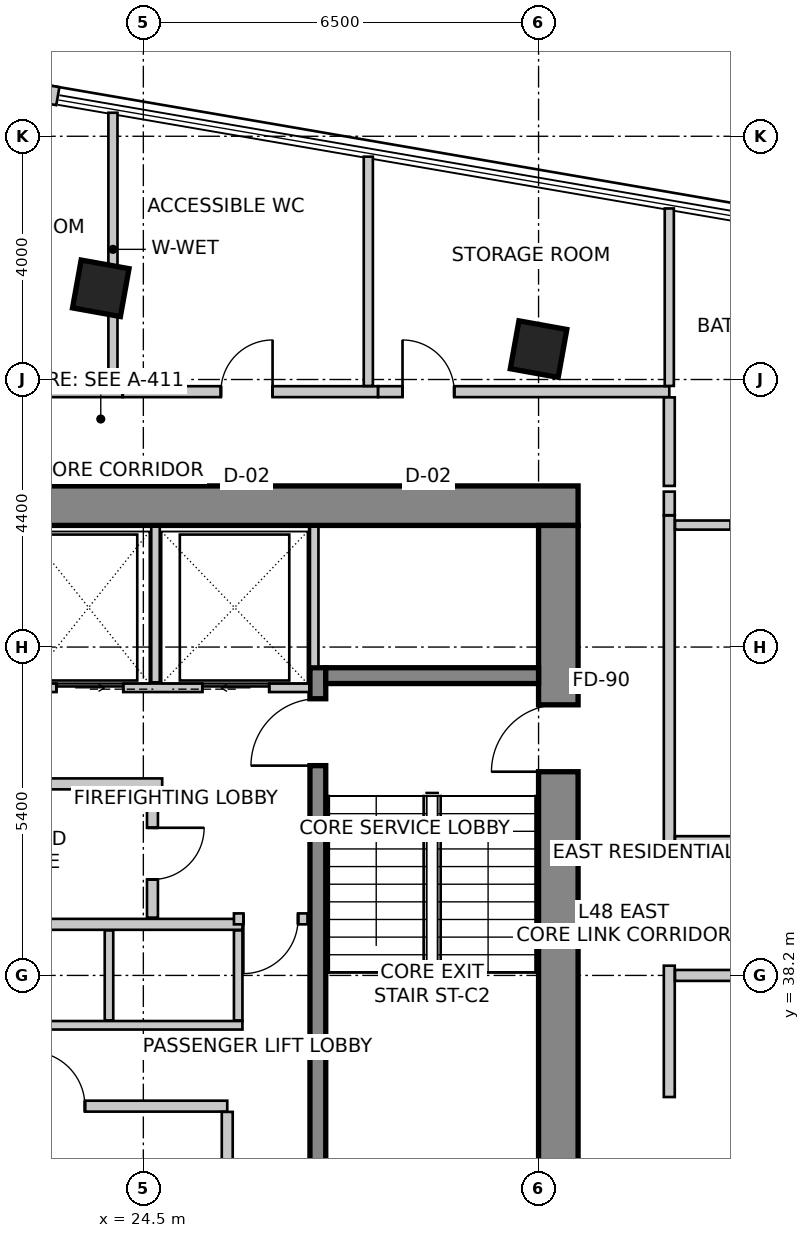
"""IFC4 building model, lengths in metres.
Left out: names, types, materials, properties, quantities, classifications, styles, units other than length and angle.
Written with IfcOpenShell. Run it as: python <this file> out.ifc"""

import sys

from ifc_helpers import new_model, si_unit, direction, frame, frame_2d, origin, origin_2d, place, context, subcontext, project, spatial, rectangle, extrude, source, transform, mapped, element, fill, save


model = new_model("IFC4")
c1 = context("Model", 3, precision=1e-05, world=origin(), true_north=direction((0.0, 1.0)))
c2 = subcontext(c1, "Body", "Model", "MODEL_VIEW")
j1 = project(units=[si_unit("LENGTHUNIT", "METRE"), si_unit("PLANEANGLEUNIT", "RADIAN")], contexts=[c1])
p1 = place(None, origin())
s1 = spatial("IfcSite", under=j1, at=p1, CompositionType="ELEMENT")
p2 = place(p1, origin())
s2 = spatial("IfcBuilding", under=s1, at=p2, CompositionType="ELEMENT")
p3 = place(p2, frame((0.0, 0.0, 193.9)))
s3 = spatial("IfcBuildingStorey", under=s2, at=p3, CompositionType="ELEMENT", Elevation=193.9)
p4 = place(p3, frame((15.95, 45.925, 0.0), z_axis=(0.0, 0.0, 1.0), x_axis=(1.0, 0.0, 0.0)))
e1 = element("IfcWall", 1, at=p4, inside=s3, PredefinedType="SHEAR", context=c2, shape_type="SweptSolid", body=[
    extrude(rectangle(XDim=15.7, YDim=0.65, at=frame_2d((7.85, 0.0))), origin(), (0.0, 0.0, 1.0), 3.5),
])
p5 = place(p3, frame((31.325, 34.2, 0.0), z_axis=(0.0, 0.0, 1.0), x_axis=(0.0, 1.0, 0.0)))
e2 = element("IfcWall", 2, at=p5, inside=s3, PredefinedType="SHEAR", context=c2, shape_type="SweptSolid", body=[
    extrude(rectangle(XDim=11.4, YDim=0.65, at=frame_2d((5.7, 0.0))), origin(), (0.0, 0.0, 1.0), 3.5),
])
m1 = source(origin(), c2, "Body", "SweptSolid", [
    extrude(rectangle(XDim=1.1, YDim=2.15, at=frame_2d((0.55, 1.075))), frame((0.0, 0.335, 0.0), z_axis=(0.0, -1.0, 0.0), x_axis=(1.0, 0.0, 0.0)), (0.0, 0.0, 1.0), 0.67),
])
p6 = place(p5, frame((7.35, 0.0, 0.0)))
e3 = element("IfcOpeningElement", 3, at=p6, cuts=e2, PredefinedType="OPENING", context=c2, shape_type="MappedRepresentation", body=[
    mapped(m1, transform((0.0, 0.0, 0.0), scale=1.0)),
])
p7 = place(p3, frame((27.37, 34.2, 0.0), z_axis=(0.0, 0.0, 1.0), x_axis=(0.0, 1.0, 0.0)))
e4 = element("IfcWall", 4, at=p7, inside=s3, PredefinedType="SHEAR", context=c2, shape_type="SweptSolid", body=[
    extrude(rectangle(XDim=9.06, YDim=0.26, at=frame_2d((4.53, 0.0))), origin(), (0.0, 0.0, 1.0), 3.5),
])
m2 = source(origin(), c2, "Body", "SweptSolid", [
    extrude(rectangle(XDim=1.1, YDim=2.15, at=frame_2d((0.55, 1.075))), frame((0.0, 0.14, 0.0), z_axis=(0.0, -1.0, 0.0), x_axis=(1.0, 0.0, 0.0)), (0.0, 0.0, 1.0), 0.28),
])
p8 = place(p7, frame((7.45, 0.0, 0.0)))
e5 = element("IfcOpeningElement", 5, at=p8, cuts=e4, PredefinedType="OPENING", context=c2, shape_type="MappedRepresentation", body=[
    mapped(m2, transform((0.0, 0.0, 0.0), scale=1.0)),
])
p9 = place(p3, frame((27.5, 43.13, 0.0), z_axis=(0.0, 0.0, 1.0), x_axis=(1.0, 0.0, 0.0)))
e6 = element("IfcWall", 6, at=p9, inside=s3, PredefinedType="SHEAR", context=c2, shape_type="SweptSolid", body=[
    extrude(rectangle(XDim=3.5, YDim=0.26, at=frame_2d((1.75, 0.0))), origin(), (0.0, 0.0, 1.0), 3.5),
])
m3 = source(origin(), c2, "Body", "SweptSolid", [
    extrude(rectangle(XDim=0.8, YDim=0.8, at=origin_2d()), origin(), (0.0, 0.0, 1.0), 3.5),
])
for number, where, z_axis, x_axis in (
    (7, (23.8, 49.5, 0.0), (0.0, 0.0, 1.0), (0.984, -0.177, 0.0)),
    (8, (31.0, 48.5, 0.0), (0.0, 0.0, 1.0), (0.984, -0.177, 0.0)),
):
    element("IfcColumn", number, at=place(p3, frame(where, z_axis=z_axis, x_axis=x_axis)), inside=s3, PredefinedType="COLUMN", context=c2, shape_type="MappedRepresentation", body=[
        mapped(m3, transform((0.0, 0.0, 0.0), scale=1.0)),
    ])
p10 = place(p3, frame((23.094, 52.66, 0.0), z_axis=(0.0, 0.0, 1.0), x_axis=(-0.985503719785, 0.169653818966, 0.0)))
e9 = element("IfcWall", 9, at=p10, inside=s3, PredefinedType="SOLIDWALL", context=c2, shape_type="SweptSolid", body=[
    extrude(rectangle(XDim=1.228, YDim=0.3, at=frame_2d((0.614, 0.0))), origin(), (0.0, 0.0, 1.0), 3.25),
])
p11 = place(p3, frame((20.37, 42.93, 0.0), z_axis=(0.0, 0.0, 1.0), x_axis=(1.0, 0.0, 0.0)))
e10 = element("IfcWall", 10, at=p11, inside=s3, PredefinedType="SOLIDWALL", context=c2, shape_type="SweptSolid", body=[
    extrude(rectangle(XDim=6.86, YDim=0.14, at=frame_2d((3.43, 0.0))), origin(), (0.0, 0.0, 1.0), 3.25),
])
m4 = source(origin(), c2, "Body", "SweptSolid", [
    extrude(rectangle(XDim=1.1, YDim=2.15, at=frame_2d((0.55, 1.075))), frame((0.0, 0.08, 0.0), z_axis=(0.0, -1.0, 0.0), x_axis=(1.0, 0.0, 0.0)), (0.0, 0.0, 1.0), 0.16),
])
p12 = place(p11, frame((0.5, 0.0, 0.0)))
e11 = element("IfcOpeningElement", 11, at=p12, cuts=e10, PredefinedType="OPENING", context=c2, shape_type="MappedRepresentation", body=[
    mapped(m4, transform((0.0, 0.0, 0.0), scale=1.0)),
])
p13 = place(p11, frame((2.7, 0.0, 0.0)))
e12 = element("IfcOpeningElement", 12, at=p13, cuts=e10, PredefinedType="OPENING", context=c2, shape_type="MappedRepresentation", body=[
    mapped(m4, transform((0.0, 0.0, 0.0), scale=1.0)),
])
p14 = place(p11, frame((5.1, 0.0, 0.0)))
e13 = element("IfcOpeningElement", 13, at=p14, cuts=e10, PredefinedType="OPENING", context=c2, shape_type="MappedRepresentation", body=[
    mapped(m4, transform((0.0, 0.0, 0.0), scale=1.0)),
])
p15 = place(p3, frame((27.31, 43.28, 0.0), z_axis=(0.0, 0.0, 1.0), x_axis=(0.0, 1.0, 0.0)))
e14 = element("IfcWall", 14, at=p15, inside=s3, PredefinedType="SOLIDWALL", context=c2, shape_type="SweptSolid", body=[
    extrude(rectangle(XDim=2.3, YDim=0.14, at=frame_2d((1.15, 0.0))), origin(), (0.0, 0.0, 1.0), 3.25),
])
p16 = place(p3, frame((24.7, 43.02, 0.0), z_axis=(0.0, 0.0, 1.0), x_axis=(0.0, 1.0, 0.0)))
e15 = element("IfcWall", 15, at=p16, inside=s3, PredefinedType="SOLIDWALL", context=c2, shape_type="SweptSolid", body=[
    extrude(rectangle(XDim=2.56, YDim=0.14, at=frame_2d((1.28, 0.0))), origin(), (0.0, 0.0, 1.0), 3.25),
])
p17 = place(p3, frame((20.38, 37.38, 0.0), z_axis=(0.0, 0.0, 1.0), x_axis=(1.0, 0.0, 0.0)))
e16 = element("IfcWall", 16, at=p17, inside=s3, PredefinedType="SOLIDWALL", context=c2, shape_type="SweptSolid", body=[
    extrude(rectangle(XDim=5.75, YDim=0.14, at=frame_2d((2.875, 0.0))), origin(), (0.0, 0.0, 1.0), 3.25),
])
m5 = source(origin(), c2, "Body", "SweptSolid", [
    extrude(rectangle(XDim=1.0, YDim=2.15, at=frame_2d((0.5, 1.075))), frame((0.0, 0.08, 0.0), z_axis=(0.0, -1.0, 0.0), x_axis=(1.0, 0.0, 0.0)), (0.0, 0.0, 1.0), 0.16),
])
p18 = place(p17, frame((0.19, 0.0, 0.0)))
e17 = element("IfcOpeningElement", 17, at=p18, cuts=e16, PredefinedType="OPENING", context=c2, shape_type="MappedRepresentation", body=[
    mapped(m5, transform((0.0, 0.0, 0.0), scale=1.0)),
])
p19 = place(p3, frame((20.38, 39.04, 0.0), z_axis=(0.0, 0.0, 1.0), x_axis=(1.0, 0.0, 0.0)))
e18 = element("IfcWall", 18, at=p19, inside=s3, PredefinedType="SOLIDWALL", context=c2, shape_type="SweptSolid", body=[
    extrude(rectangle(XDim=5.75, YDim=0.18, at=frame_2d((2.875, 0.0))), origin(), (0.0, 0.0, 1.0), 3.25),
])
for number, where, z_axis, x_axis in (
    (19, (26.06, 37.46, 0.0), (0.0, 0.0, 1.0), (0.0, 1.0, 0.0)),
    (20, (23.935, 37.46, 0.0), (0.0, 0.0, 1.0), (0.0, 1.0, 0.0)),
):
    element("IfcWall", number, at=place(p3, frame(where, z_axis=z_axis, x_axis=x_axis)), inside=s3, PredefinedType="SOLIDWALL", context=c2, shape_type="SweptSolid", body=[
        extrude(rectangle(XDim=1.48, YDim=0.14, at=frame_2d((0.74, 0.0))), origin(), (0.0, 0.0, 1.0), 3.25),
    ])
p20 = place(p3, frame((24.81, 41.35, 0.0), z_axis=(0.0, 0.0, 1.0), x_axis=(-1.0, 0.0, 0.0)))
e21 = element("IfcWall", 21, at=p20, inside=s3, PredefinedType="PARTITIONING", context=c2, shape_type="SweptSolid", body=[
    extrude(rectangle(XDim=4.43, YDim=0.18, at=frame_2d((2.215, 0.0))), origin(), (0.0, 0.0, 1.0), 3.25),
])
p21 = place(p3, frame((24.65, 41.256, 0.0), z_axis=(0.0, 0.0, 1.0), x_axis=(0.0, -1.0, 0.0)))
e22 = element("IfcWall", 22, at=p21, inside=s3, PredefinedType="PARTITIONING", context=c2, shape_type="SweptSolid", body=[
    extrude(rectangle(XDim=2.106, YDim=0.18, at=frame_2d((1.053, 0.0))), origin(), (0.0, 0.0, 1.0), 3.25),
])
m6 = source(origin(), c2, "Body", "SweptSolid", [
    extrude(rectangle(XDim=0.85, YDim=2.15, at=frame_2d((0.425, 1.075))), frame((0.0, 0.1, 0.0), z_axis=(0.0, -1.0, 0.0), x_axis=(1.0, 0.0, 0.0)), (0.0, 0.0, 1.0), 0.2),
])
p22 = place(p21, frame((0.628, 0.0, 0.0)))
e23 = element("IfcOpeningElement", 23, at=p22, cuts=e22, PredefinedType="OPENING", context=c2, shape_type="MappedRepresentation", body=[
    mapped(m6, transform((0.0, 0.0, 0.0), scale=1.0)),
])
p23 = place(p3, frame((27.2, 39.13, 0.0), z_axis=(0.0, 0.0, 1.0), x_axis=(-1.0, 0.0, 0.0)))
e24 = element("IfcWall", 24, at=p23, inside=s3, PredefinedType="PARTITIONING", context=c2, shape_type="SweptSolid", body=[
    extrude(rectangle(XDim=1.21, YDim=0.18, at=frame_2d((0.605, 0.0))), origin(), (0.0, 0.0, 1.0), 3.25),
])
m7 = source(origin(), c2, "Body", "SweptSolid", [
    extrude(rectangle(XDim=0.9, YDim=2.15, at=frame_2d((0.45, 1.075))), frame((0.0, 0.1, 0.0), z_axis=(0.0, -1.0, 0.0), x_axis=(1.0, 0.0, 0.0)), (0.0, 0.0, 1.0), 0.2),
])
p24 = place(p23, frame((0.155, 0.0, 0.0)))
e25 = element("IfcOpeningElement", 25, at=p24, cuts=e24, PredefinedType="OPENING", context=c2, shape_type="MappedRepresentation", body=[
    mapped(m7, transform((0.0, 0.0, 0.0), scale=1.0)),
])
p25 = place(p3, frame((20.42, 36.05, 0.0), z_axis=(0.0, 0.0, 1.0), x_axis=(1.0, 0.0, 0.0)))
e26 = element("IfcWall", 26, at=p25, inside=s3, PredefinedType="PARTITIONING", context=c2, shape_type="SweptSolid", body=[
    extrude(rectangle(XDim=5.46, YDim=0.18, at=frame_2d((2.73, 0.0))), origin(), (0.0, 0.0, 1.0), 3.25),
])
p26 = place(p25, frame((2.219, 0.0, 0.0)))
e27 = element("IfcOpeningElement", 27, at=p26, cuts=e26, PredefinedType="OPENING", context=c2, shape_type="MappedRepresentation", body=[
    mapped(m7, transform((0.0, 0.0, 0.0), scale=1.0)),
])
p27 = place(p3, frame((25.88, 35.956, 0.0), z_axis=(0.0, 0.0, 1.0), x_axis=(0.0, -1.0, 0.0)))
e28 = element("IfcWall", 28, at=p27, inside=s3, PredefinedType="PARTITIONING", context=c2, shape_type="SweptSolid", body=[
    extrude(rectangle(XDim=1.706, YDim=0.18, at=frame_2d((0.853, 0.0))), origin(), (0.0, 0.0, 1.0), 2.542),
])
p28 = place(p3, frame((14.453, 47.8, 0.0), z_axis=(0.0, 0.0, 1.0), x_axis=(1.0, 0.0, 0.0)))
e29 = element("IfcWall", 29, at=p28, inside=s3, PredefinedType="PARTITIONING", context=c2, shape_type="SweptSolid", body=[
    extrude(rectangle(XDim=9.707, YDim=0.18, at=frame_2d((4.854, 0.0))), origin(), (0.0, 0.0, 1.0), 2.835),
])
p29 = place(p28, frame((4.404, 0.0, 0.0)))
e30 = element("IfcOpeningElement", 30, at=p29, cuts=e29, PredefinedType="OPENING", context=c2, shape_type="MappedRepresentation", body=[
    mapped(m7, transform((0.0, 0.0, 0.0), scale=1.0)),
])
p30 = place(p3, frame((24.162, 47.8, 0.0), z_axis=(0.0, 0.0, 1.0), x_axis=(1.0, 0.0, 0.0)))
e31 = element("IfcWall", 31, at=p30, inside=s3, PredefinedType="PARTITIONING", context=c2, shape_type="SweptSolid", body=[
    extrude(rectangle(XDim=4.198, YDim=0.18, at=frame_2d((2.099, 0.0))), origin(), (0.0, 0.0, 1.0), 3.25),
])
p31 = place(p30, frame((1.613, 0.0, 0.0)))
e32 = element("IfcOpeningElement", 32, at=p31, cuts=e31, PredefinedType="OPENING", context=c2, shape_type="MappedRepresentation", body=[
    mapped(m6, transform((0.0, 0.0, 0.0), scale=1.0)),
])
p32 = place(p3, frame((28.362, 47.8, 0.0), z_axis=(0.0, 0.0, 1.0), x_axis=(1.0, 0.0, 0.0)))
e33 = element("IfcWall", 33, at=p32, inside=s3, PredefinedType="PARTITIONING", context=c2, shape_type="SweptSolid", body=[
    extrude(rectangle(XDim=4.788, YDim=0.18, at=frame_2d((2.394, 0.0))), origin(), (0.0, 0.0, 1.0), 2.688),
])
p33 = place(p32, frame((0.401, 0.0, 0.0)))
e34 = element("IfcOpeningElement", 34, at=p33, cuts=e33, PredefinedType="OPENING", context=c2, shape_type="MappedRepresentation", body=[
    mapped(m6, transform((0.0, 0.0, 0.0), scale=1.0)),
])
p34 = place(p3, frame((33.15, 47.706, 0.0), z_axis=(0.0, 0.0, 1.0), x_axis=(0.0, -1.0, 0.0)))
e35 = element("IfcWall", 35, at=p34, inside=s3, PredefinedType="PARTITIONING", context=c2, shape_type="SweptSolid", body=[
    extrude(rectangle(XDim=1.456, YDim=0.18, at=frame_2d((0.728, 0.0))), origin(), (0.0, 0.0, 1.0), 2.688),
])
p35 = place(p3, frame((33.15, 45.766, 0.0), z_axis=(0.0, 0.0, 1.0), x_axis=(0.0, -1.0, 0.0)))
e36 = element("IfcWall", 36, at=p35, inside=s3, PredefinedType="PARTITIONING", context=c2, shape_type="SweptSolid", body=[
    extrude(rectangle(XDim=5.526, YDim=0.18, at=frame_2d((2.763, 0.0))), origin(), (0.0, 0.0, 1.0), 2.688),
])
p36 = place(p3, frame((33.15, 46.156, 0.0), z_axis=(0.0, 0.0, 1.0), x_axis=(0.0, -1.0, 0.0)))
e37 = element("IfcWall", 37, at=p36, inside=s3, PredefinedType="PARTITIONING", context=c2, shape_type="SweptSolid", body=[
    extrude(rectangle(XDim=0.388, YDim=0.18, at=frame_2d((0.194, 0.0))), origin(), (0.0, 0.0, 1.0), 3.25),
])
p37 = place(p3, frame((33.15, 38.36, 0.0), z_axis=(0.0, 0.0, 1.0), x_axis=(0.0, -1.0, 0.0)))
e38 = element("IfcWall", 38, at=p37, inside=s3, PredefinedType="PARTITIONING", context=c2, shape_type="SweptSolid", body=[
    extrude(rectangle(XDim=2.16, YDim=0.18, at=frame_2d((1.08, 0.0))), origin(), (0.0, 0.0, 1.0), 3.25),
])
p38 = place(p3, frame((24.0, 52.387, 0.0), z_axis=(0.0, 0.0, 1.0), x_axis=(0.0, -1.0, 0.0)))
e39 = element("IfcWall", 39, at=p38, inside=s3, PredefinedType="PARTITIONING", context=c2, shape_type="SweptSolid", body=[
    extrude(rectangle(XDim=4.493, YDim=0.15, at=frame_2d((2.247, 0.0))), origin(), (0.0, 0.0, 1.0), 2.542),
])
p39 = place(p3, frame((28.2, 51.665, 0.0), z_axis=(0.0, 0.0, 1.0), x_axis=(0.0, -1.0, 0.0)))
e40 = element("IfcWall", 40, at=p39, inside=s3, PredefinedType="PARTITIONING", context=c2, shape_type="SweptSolid", body=[
    extrude(rectangle(XDim=3.771, YDim=0.15, at=frame_2d((1.885, 0.0))), origin(), (0.0, 0.0, 1.0), 2.542),
])
p40 = place(p3, frame((33.15, 50.813, 0.0), z_axis=(0.0, 0.0, 1.0), x_axis=(0.0, -1.0, 0.0)))
e41 = element("IfcWall", 41, at=p40, inside=s3, PredefinedType="PARTITIONING", context=c2, shape_type="SweptSolid", body=[
    extrude(rectangle(XDim=2.919, YDim=0.15, at=frame_2d((1.459, 0.0))), origin(), (0.0, 0.0, 1.0), 2.542),
])
p41 = place(p3, frame((33.244, 40.4, 0.0), z_axis=(0.0, 0.0, 1.0), x_axis=(1.0, 0.0, 0.0)))
e42 = element("IfcWall", 42, at=p41, inside=s3, PredefinedType="PARTITIONING", context=c2, shape_type="SweptSolid", body=[
    extrude(rectangle(XDim=7.958, YDim=0.18, at=frame_2d((3.979, 0.0))), origin(), (0.0, 0.0, 1.0), 2.688),
])
p42 = place(p41, frame((2.807, 0.0, 0.0)))
e43 = element("IfcOpeningElement", 43, at=p42, cuts=e42, PredefinedType="OPENING", context=c2, shape_type="MappedRepresentation", body=[
    mapped(m7, transform((0.0, 0.0, 0.0), scale=1.0)),
])
p43 = place(p3, frame((44.338, 38.2, 0.0), z_axis=(0.0, 0.0, 1.0), x_axis=(-1.0, 0.0, 0.0)))
e44 = element("IfcWall", 44, at=p43, inside=s3, PredefinedType="PARTITIONING", context=c2, shape_type="SweptSolid", body=[
    extrude(rectangle(XDim=11.094, YDim=0.18, at=frame_2d((5.547, 0.0))), origin(), (0.0, 0.0, 1.0), 2.688),
])
p44 = place(p43, frame((5.097, 0.0, 0.0)))
e45 = element("IfcOpeningElement", 45, at=p44, cuts=e44, PredefinedType="OPENING", context=c2, shape_type="MappedRepresentation", body=[
    mapped(m7, transform((0.0, 0.0, 0.0), scale=1.0)),
])
p45 = place(p3, frame((33.244, 45.606, 0.0), z_axis=(0.0, 0.0, 1.0), x_axis=(1.0, 0.0, 0.0)))
e46 = element("IfcWall", 46, at=p45, inside=s3, PredefinedType="PARTITIONING", context=c2, shape_type="SweptSolid", body=[
    extrude(rectangle(XDim=2.816, YDim=0.15, at=frame_2d((1.408, 0.0))), origin(), (0.0, 0.0, 1.0), 2.688),
])
m8 = source(origin(), c2, "Body", "SweptSolid", [
    extrude(rectangle(XDim=0.85, YDim=2.15, at=frame_2d((0.425, 1.075))), frame((0.0, 0.085, 0.0), z_axis=(0.0, -1.0, 0.0), x_axis=(1.0, 0.0, 0.0)), (0.0, 0.0, 1.0), 0.17),
])
p46 = place(p45, frame((0.919, 0.0, 0.0)))
e47 = element("IfcOpeningElement", 47, at=p46, cuts=e46, PredefinedType="OPENING", context=c2, shape_type="MappedRepresentation", body=[
    mapped(m8, transform((0.0, 0.0, 0.0), scale=1.0)),
])
m9 = source(origin(), c2, "Body", "SweptSolid", [
    extrude(rectangle(XDim=1.1, YDim=2.15, at=frame_2d((0.55, 1.075))), frame((0.0, 0.025, 0.0), z_axis=(0.0, -1.0, 0.0), x_axis=(1.0, 0.0, 0.0)), (0.0, 0.0, 1.0), 0.05),
])
p47 = place(p13, origin())
e48 = element("IfcDoor", 48, at=p47, inside=s3, OperationType="SLIDING_TO_RIGHT", PredefinedType="DOOR", context=c2, shape_type="MappedRepresentation", body=[
    mapped(m9, transform((0.0, 0.0, 0.0), scale=1.0)),
])
fill(e12, e48)
m10 = source(origin(), c2, "Body", "SweptSolid", [
    extrude(rectangle(XDim=1.1, YDim=2.15, at=frame_2d((0.55, 1.075))), frame((0.0, 0.025, 0.0), z_axis=(0.0, -1.0, 0.0), x_axis=(1.0, 0.0, 0.0)), (0.0, 0.0, 1.0), 0.05),
])
p48 = place(p14, origin())
e49 = element("IfcDoor", 49, at=p48, inside=s3, OperationType="SLIDING_TO_LEFT", PredefinedType="DOOR", context=c2, shape_type="MappedRepresentation", body=[
    mapped(m10, transform((0.0, 0.0, 0.0), scale=1.0)),
])
fill(e13, e49)
m11 = source(origin(), c2, "Body", "SweptSolid", [
    extrude(rectangle(XDim=1.1, YDim=2.15, at=frame_2d((0.55, 1.075))), frame((0.0, 0.025, 0.0), z_axis=(0.0, -1.0, 0.0), x_axis=(1.0, 0.0, 0.0)), (0.0, 0.0, 1.0), 0.05),
])
p49 = place(p8, origin())
e50 = element("IfcDoor", 50, at=p49, inside=s3, OperationType="SINGLE_SWING_LEFT", PredefinedType="DOOR", context=c2, shape_type="MappedRepresentation", body=[
    mapped(m11, transform((0.0, 0.0, 0.0), scale=1.0)),
])
fill(e5, e50)
p50 = place(p6, origin())
e51 = element("IfcDoor", 51, at=p50, inside=s3, OperationType="SINGLE_SWING_LEFT", PredefinedType="DOOR", context=c2, shape_type="MappedRepresentation", body=[
    mapped(m11, transform((0.0, 0.0, 0.0), scale=1.0)),
])
fill(e3, e51)
m12 = source(origin(), c2, "Body", "SweptSolid", [
    extrude(rectangle(XDim=0.85, YDim=2.15, at=frame_2d((0.425, 1.075))), frame((0.0, 0.025, 0.0), z_axis=(0.0, -1.0, 0.0), x_axis=(1.0, 0.0, 0.0)), (0.0, 0.0, 1.0), 0.05),
])
p51 = place(p22, origin())
e52 = element("IfcDoor", 52, at=p51, inside=s3, OperationType="SINGLE_SWING_LEFT", PredefinedType="DOOR", context=c2, shape_type="MappedRepresentation", body=[
    mapped(m12, transform((0.0, 0.0, 0.0), scale=1.0)),
])
fill(e23, e52)
m13 = source(origin(), c2, "Body", "SweptSolid", [
    extrude(rectangle(XDim=0.9, YDim=2.15, at=frame_2d((0.45, 1.075))), frame((0.0, 0.025, 0.0), z_axis=(0.0, -1.0, 0.0), x_axis=(1.0, 0.0, 0.0)), (0.0, 0.0, 1.0), 0.05),
])
p52 = place(p24, origin())
e53 = element("IfcDoor", 53, at=p52, inside=s3, OperationType="SINGLE_SWING_RIGHT", PredefinedType="DOOR", context=c2, shape_type="MappedRepresentation", body=[
    mapped(m13, transform((0.0, 0.0, 0.0), scale=1.0)),
])
fill(e25, e53)
p53 = place(p26, origin())
e54 = element("IfcDoor", 54, at=p53, inside=s3, OperationType="SINGLE_SWING_LEFT", PredefinedType="DOOR", context=c2, shape_type="MappedRepresentation", body=[
    mapped(m13, transform((0.0, 0.0, 0.0), scale=1.0)),
])
fill(e27, e54)
m14 = source(origin(), c2, "Body", "SweptSolid", [
    extrude(rectangle(XDim=0.85, YDim=2.15, at=frame_2d((0.425, 1.075))), frame((0.0, 0.025, 0.0), z_axis=(0.0, -1.0, 0.0), x_axis=(1.0, 0.0, 0.0)), (0.0, 0.0, 1.0), 0.05),
])
p54 = place(p31, origin())
e55 = element("IfcDoor", 55, at=p54, inside=s3, OperationType="SINGLE_SWING_RIGHT", PredefinedType="DOOR", context=c2, shape_type="MappedRepresentation", body=[
    mapped(m14, transform((0.0, 0.0, 0.0), scale=1.0)),
])
fill(e32, e55)
p55 = place(p33, origin())
e56 = element("IfcDoor", 56, at=p55, inside=s3, OperationType="SINGLE_SWING_LEFT", PredefinedType="DOOR", context=c2, shape_type="MappedRepresentation", body=[
    mapped(m14, transform((0.0, 0.0, 0.0), scale=1.0)),
])
fill(e34, e56)
save(model, sys.argv[1])
